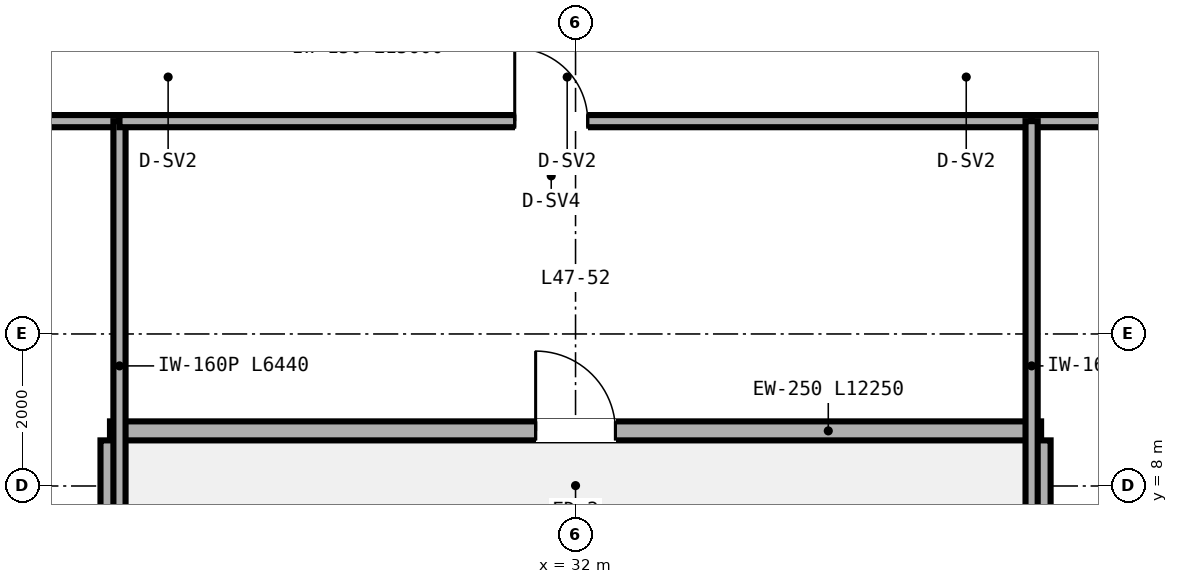
"""IFC4 building model, lengths in metres.
Left out: names, types, materials, properties, quantities, classifications, styles, units other than length and angle.
Written with IfcOpenShell. Run it as: python <this file> out.ifc"""

import sys

from ifc_helpers import new_model, si_unit, direction, frame, frame_2d, origin, place, context, subcontext, project, spatial, rectangle, extrude, source, transform, mapped, element, fill, save


model = new_model("IFC4")
c1 = context("Model", 3, precision=1e-05, world=origin(), true_north=direction((0.0, 1.0)))
c2 = subcontext(c1, "Body", "Model", "MODEL_VIEW")
j1 = project(units=[si_unit("LENGTHUNIT", "METRE"), si_unit("PLANEANGLEUNIT", "RADIAN")], contexts=[c1])
p1 = place(None, origin())
s1 = spatial("IfcSite", under=j1, at=p1, CompositionType="ELEMENT")
p2 = place(p1, origin())
s2 = spatial("IfcBuilding", under=s1, at=p2, CompositionType="ELEMENT")
p3 = place(p2, frame((0.0, 0.0, 188.4)))
s3 = spatial("IfcBuildingStorey", under=s2, at=p3, CompositionType="ELEMENT", Elevation=188.4)
p4 = place(p3, frame((25.875, 8.725, 0.0), z_axis=(0.0, 0.0, 1.0), x_axis=(1.0, 0.0, 0.0)))
e1 = element("IfcWall", 1, at=p4, inside=s3, PredefinedType="SOLIDWALL", context=c2, shape_type="SweptSolid", body=[
    extrude(rectangle(XDim=12.25, YDim=0.25, at=frame_2d((6.125, 0.0))), origin(), (0.0, 0.0, 1.0), 3.37),
])
p5 = place(p4, frame((5.6, 0.0, 0.0)))
e2 = element("IfcOpeningElement", 2, at=p5, cuts=e1, PredefinedType="OPENING", context=c2, shape_type="SweptSolid", body=[
    extrude(rectangle(XDim=1.05, YDim=2.15, at=frame_2d((0.525, 1.075))), frame((0.0, 0.135, 0.0), z_axis=(0.0, -1.0, 0.0), x_axis=(1.0, 0.0, 0.0)), (0.0, 0.0, 1.0), 0.27),
])
for number, where, z_axis, x_axis in (
    (3, (25.875, 6.1, 0.0), (0.0, 0.0, 1.0), (0.0, 1.0, 0.0)),
    (4, (38.125, 6.1, 0.0), (0.0, 0.0, 1.0), (0.0, 1.0, 0.0)),
):
    element("IfcWall", number, at=place(p3, frame(where, z_axis=z_axis, x_axis=x_axis)), inside=s3, PredefinedType="SOLIDWALL", context=c2, shape_type="SweptSolid", body=[
        extrude(rectangle(XDim=2.5, YDim=0.25, at=frame_2d((1.25, 0.0))), origin(), (0.0, 0.0, 1.0), 2.443),
    ])
p6 = place(p3, frame((14.0, 12.8, 0.0), z_axis=(0.0, 0.0, 1.0), x_axis=(1.0, 0.0, 0.0)))
e5 = element("IfcWall", 5, at=p6, inside=s3, PredefinedType="PARTITIONING", context=c2, shape_type="SweptSolid", body=[
    extrude(rectangle(XDim=12.0, YDim=0.16, at=frame_2d((6.0, 0.0))), origin(), (0.0, 0.0, 1.0), 2.913),
])
p7 = place(p6, frame((4.54, 0.0, 0.0)))
e6 = element("IfcOpeningElement", 6, at=p7, cuts=e5, PredefinedType="OPENING", context=c2, shape_type="SweptSolid", body=[
    extrude(rectangle(XDim=0.94, YDim=2.15, at=frame_2d((0.47, 1.075))), frame((0.0, 0.09, 0.0), z_axis=(0.0, -1.0, 0.0), x_axis=(1.0, 0.0, 0.0)), (0.0, 0.0, 1.0), 0.18),
])
p8 = place(p6, frame((8.42, 0.0, 0.0)))
e7 = element("IfcOpeningElement", 7, at=p8, cuts=e5, PredefinedType="OPENING", context=c2, shape_type="SweptSolid", body=[
    extrude(rectangle(XDim=0.96, YDim=2.15, at=frame_2d((0.48, 1.075))), frame((0.0, 0.09, 0.0), z_axis=(0.0, -1.0, 0.0), x_axis=(1.0, 0.0, 0.0)), (0.0, 0.0, 1.0), 0.18),
])
p9 = place(p3, frame((26.0, 6.36, 0.0), z_axis=(0.0, 0.0, 1.0), x_axis=(0.0, 1.0, 0.0)))
e8 = element("IfcWall", 8, at=p9, inside=s3, PredefinedType="PARTITIONING", context=c2, shape_type="SweptSolid", body=[
    extrude(rectangle(XDim=6.44, YDim=0.16, at=frame_2d((3.22, 0.0))), origin(), (0.0, 0.0, 1.0), 2.443),
])
p10 = place(p3, frame((26.0, 12.8, 0.0), z_axis=(0.0, 0.0, 1.0), x_axis=(1.0, 0.0, 0.0)))
e9 = element("IfcWall", 9, at=p10, inside=s3, PredefinedType="PARTITIONING", context=c2, shape_type="SweptSolid", body=[
    extrude(rectangle(XDim=12.0, YDim=0.16, at=frame_2d((6.0, 0.0))), origin(), (0.0, 0.0, 1.0), 3.37),
])
p11 = place(p10, frame((5.2, 0.0, 0.0)))
e10 = element("IfcOpeningElement", 10, at=p11, cuts=e9, PredefinedType="OPENING", context=c2, shape_type="SweptSolid", body=[
    extrude(rectangle(XDim=0.96, YDim=2.15, at=frame_2d((0.48, 1.075))), frame((0.0, 0.09, 0.0), z_axis=(0.0, -1.0, 0.0), x_axis=(1.0, 0.0, 0.0)), (0.0, 0.0, 1.0), 0.18),
])
p12 = place(p3, frame((38.0, 12.8, 0.0), z_axis=(0.0, 0.0, 1.0), x_axis=(1.0, 0.0, 0.0)))
e11 = element("IfcWall", 11, at=p12, inside=s3, PredefinedType="PARTITIONING", context=c2, shape_type="SweptSolid", body=[
    extrude(rectangle(XDim=12.0, YDim=0.16, at=frame_2d((6.0, 0.0))), origin(), (0.0, 0.0, 1.0), 2.913),
])
p13 = place(p12, frame((2.42, 0.0, 0.0)))
e12 = element("IfcOpeningElement", 12, at=p13, cuts=e11, PredefinedType="OPENING", context=c2, shape_type="SweptSolid", body=[
    extrude(rectangle(XDim=0.96, YDim=2.15, at=frame_2d((0.48, 1.075))), frame((0.0, 0.09, 0.0), z_axis=(0.0, -1.0, 0.0), x_axis=(1.0, 0.0, 0.0)), (0.0, 0.0, 1.0), 0.18),
])
p14 = place(p12, frame((10.74, 0.0, 0.0)))
e13 = element("IfcOpeningElement", 13, at=p14, cuts=e11, PredefinedType="OPENING", context=c2, shape_type="SweptSolid", body=[
    extrude(rectangle(XDim=0.94, YDim=2.15, at=frame_2d((0.47, 1.075))), frame((0.0, 0.09, 0.0), z_axis=(0.0, -1.0, 0.0), x_axis=(1.0, 0.0, 0.0)), (0.0, 0.0, 1.0), 0.18),
])
p15 = place(p3, frame((38.0, 6.36, 0.0), z_axis=(0.0, 0.0, 1.0), x_axis=(0.0, 1.0, 0.0)))
e14 = element("IfcWall", 14, at=p15, inside=s3, PredefinedType="PARTITIONING", context=c2, shape_type="SweptSolid", body=[
    extrude(rectangle(XDim=6.44, YDim=0.16, at=frame_2d((3.22, 0.0))), origin(), (0.0, 0.0, 1.0), 2.443),
])
m1 = source(origin(), c2, "Body", "SweptSolid", [
    extrude(rectangle(XDim=1.05, YDim=2.15, at=frame_2d((0.525, 1.075))), frame((0.0, 0.025, 0.0), z_axis=(0.0, -1.0, 0.0), x_axis=(1.0, 0.0, 0.0)), (0.0, 0.0, 1.0), 0.05),
])
p16 = place(p5, origin())
e15 = element("IfcDoor", 15, at=p16, inside=s3, OperationType="SINGLE_SWING_LEFT", PredefinedType="DOOR", context=c2, shape_type="MappedRepresentation", body=[
    mapped(m1, transform((0.0, 0.0, 0.0), scale=1.0)),
])
fill(e2, e15)
m2 = source(origin(), c2, "Body", "SweptSolid", [
    extrude(rectangle(XDim=0.96, YDim=2.15, at=frame_2d((0.48, 1.075))), frame((0.0, 0.025, 0.0), z_axis=(0.0, -1.0, 0.0), x_axis=(1.0, 0.0, 0.0)), (0.0, 0.0, 1.0), 0.05),
])
p17 = place(p11, origin())
e16 = element("IfcDoor", 16, at=p17, inside=s3, OperationType="SINGLE_SWING_LEFT", PredefinedType="DOOR", context=c2, shape_type="MappedRepresentation", body=[
    mapped(m2, transform((0.0, 0.0, 0.0), scale=1.0)),
])
fill(e10, e16)
save(model, sys.argv[1])
